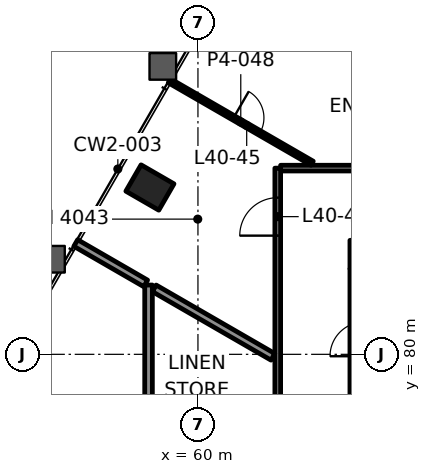
"""IFC4 building model, lengths in metres.
Left out: names, types, materials, properties, quantities, classifications, styles, units other than length and angle.
Written with IfcOpenShell. Run it as: python <this file> out.ifc"""

import sys

from ifc_helpers import new_model, si_unit, direction, frame, frame_2d, origin, origin_2d, place, context, subcontext, project, spatial, rectangle, hollow_rectangle, extrude, element, fill, save


model = new_model("IFC4")
c1 = context("Model", 3, precision=1e-05, world=origin(), true_north=direction((0.0, 1.0)))
c2 = subcontext(c1, "Body", "Model", "MODEL_VIEW")
j1 = project(units=[si_unit("LENGTHUNIT", "METRE"), si_unit("PLANEANGLEUNIT", "RADIAN")], contexts=[c1])
p1 = place(None, origin())
s1 = spatial("IfcSite", under=j1, at=p1, CompositionType="ELEMENT")
p2 = place(p1, origin())
s2 = spatial("IfcBuilding", under=s1, at=p2, CompositionType="ELEMENT")
p3 = place(p2, frame((0.0, 0.0, 175.3)))
s3 = spatial("IfcBuildingStorey", under=s2, at=p3, CompositionType="ELEMENT", Elevation=175.3)
p4 = place(p3, frame((58.737, 84.39, -0.0), z_axis=(0.0, 0.0, 1.0), x_axis=(-0.5, -0.866025403784, 0.0)))
e1 = element("IfcColumn", 1, at=p4, inside=s3, PredefinedType="COLUMN", context=c2, shape_type="SweptSolid", body=[
    extrude(hollow_rectangle(XDim=0.8, YDim=1.0, WallThickness=0.05, at=origin_2d()), origin(), (0.0, 0.0, 1.0), 3.9),
])
p5 = place(p3, frame((64.0, 82.625, 0.0), z_axis=(0.0, 0.0, 1.0), x_axis=(1.0, 0.0, 0.0)))
e2 = element("IfcWall", 2, at=p5, inside=s3, PredefinedType="SHEAR", context=c2, shape_type="SweptSolid", body=[
    extrude(rectangle(XDim=22.0, YDim=0.75, at=frame_2d((11.0, 0.0))), origin(), (0.0, 0.0, 1.0), 3.7),
])
p6 = place(p5, frame((3.695, 0.0, 0.0)))
e3 = element("IfcOpeningElement", 3, at=p6, cuts=e2, PredefinedType="OPENING", context=c2, shape_type="SweptSolid", body=[
    extrude(rectangle(XDim=1.0, YDim=2.1, at=frame_2d((0.5, 1.05))), frame((0.0, 0.385, 0.0), z_axis=(0.0, -1.0, 0.0), x_axis=(1.0, 0.0, 0.0)), (0.0, 0.0, 1.0), 0.77),
])
p7 = place(p5, frame((17.505, 0.0, 0.0)))
e4 = element("IfcOpeningElement", 4, at=p7, cuts=e2, PredefinedType="OPENING", context=c2, shape_type="SweptSolid", body=[
    extrude(rectangle(XDim=1.0, YDim=2.1, at=frame_2d((0.5, 1.05))), frame((0.0, 0.385, 0.0), z_axis=(0.0, -1.0, 0.0), x_axis=(1.0, 0.0, 0.0)), (0.0, 0.0, 1.0), 0.77),
])
p8 = place(p5, frame((10.65, 0.0, 0.0)))
e5 = element("IfcOpeningElement", 5, at=p8, cuts=e2, PredefinedType="OPENING", context=c2, shape_type="SweptSolid", body=[
    extrude(rectangle(XDim=0.9, YDim=2.1, at=frame_2d((0.45, 1.05))), frame((0.0, 0.385, 0.0), z_axis=(0.0, -1.0, 0.0), x_axis=(1.0, 0.0, 0.0)), (0.0, 0.0, 1.0), 0.77),
])
p9 = place(p3, frame((64.375, 67.75, 0.0), z_axis=(0.0, 0.0, 1.0), x_axis=(0.0, 1.0, 0.0)))
e6 = element("IfcWall", 6, at=p9, inside=s3, PredefinedType="SHEAR", context=c2, shape_type="SweptSolid", body=[
    extrude(rectangle(XDim=14.5, YDim=0.75, at=frame_2d((7.25, 0.0))), origin(), (0.0, 0.0, 1.0), 3.7),
])
p10 = place(p9, frame((4.65, 0.0, 0.0)))
e7 = element("IfcOpeningElement", 7, at=p10, cuts=e6, PredefinedType="OPENING", context=c2, shape_type="SweptSolid", body=[
    extrude(rectangle(XDim=1.8, YDim=2.1, at=frame_2d((0.9, 1.05))), frame((0.0, 0.385, 0.0), z_axis=(0.0, -1.0, 0.0), x_axis=(1.0, 0.0, 0.0)), (0.0, 0.0, 1.0), 0.77),
])
p11 = place(p9, frame((8.5, 0.0, 0.0)))
e8 = element("IfcOpeningElement", 8, at=p11, cuts=e6, PredefinedType="OPENING", context=c2, shape_type="SweptSolid", body=[
    extrude(rectangle(XDim=0.9, YDim=2.1, at=frame_2d((0.45, 1.05))), frame((0.0, 0.385, 0.0), z_axis=(0.0, -1.0, 0.0), x_axis=(1.0, 0.0, 0.0)), (0.0, 0.0, 1.0), 0.77),
])
p12 = place(p9, frame((12.2, 0.0, 0.0)))
e9 = element("IfcOpeningElement", 9, at=p12, cuts=e6, PredefinedType="OPENING", context=c2, shape_type="SweptSolid", body=[
    extrude(rectangle(XDim=0.9, YDim=2.1, at=frame_2d((0.45, 1.05))), frame((0.0, 0.385, 0.0), z_axis=(0.0, -1.0, 0.0), x_axis=(1.0, 0.0, 0.0)), (0.0, 0.0, 1.0), 0.77),
])
p13 = place(p3, frame((62.176, 84.9, 0.0), z_axis=(0.0, 0.0, 1.0), x_axis=(1.0, 0.0, 0.0)))
e10 = element("IfcWall", 10, at=p13, inside=s3, PredefinedType="PARTITIONING", context=c2, shape_type="SweptSolid", body=[
    extrude(rectangle(XDim=9.55, YDim=0.15, at=frame_2d((4.775, 0.0))), origin(), (0.0, 0.0, 1.0), 3.1),
])
p14 = place(p3, frame((62.1, 68.591, 0.0), z_axis=(0.0, 0.0, 1.0), x_axis=(0.0, 1.0, 0.0)))
e11 = element("IfcWall", 11, at=p14, inside=s3, PredefinedType="PARTITIONING", context=c2, shape_type="SweptSolid", body=[
    extrude(rectangle(XDim=16.308, YDim=0.15, at=frame_2d((8.154, 0.0))), origin(), (0.0, 0.0, 1.0), 3.1),
])
p15 = place(p14, frame((4.999, 0.0, 0.0)))
e12 = element("IfcOpeningElement", 12, at=p15, cuts=e11, PredefinedType="OPENING", context=c2, shape_type="SweptSolid", body=[
    extrude(rectangle(XDim=0.9, YDim=2.1, at=frame_2d((0.45, 1.05))), frame((0.0, 0.085, 0.0), z_axis=(0.0, -1.0, 0.0), x_axis=(1.0, 0.0, 0.0)), (0.0, 0.0, 1.0), 0.17),
])
p16 = place(p14, frame((8.879, 0.0, 0.0)))
e13 = element("IfcOpeningElement", 13, at=p16, cuts=e11, PredefinedType="OPENING", context=c2, shape_type="SweptSolid", body=[
    extrude(rectangle(XDim=0.9, YDim=2.1, at=frame_2d((0.45, 1.05))), frame((0.0, 0.085, 0.0), z_axis=(0.0, -1.0, 0.0), x_axis=(1.0, 0.0, 0.0)), (0.0, 0.0, 1.0), 0.17),
])
p17 = place(p14, frame((14.532, 0.0, 0.0)))
e14 = element("IfcOpeningElement", 14, at=p17, cuts=e11, PredefinedType="OPENING", context=c2, shape_type="SweptSolid", body=[
    extrude(rectangle(XDim=1.0, YDim=2.1, at=frame_2d((0.5, 1.05))), frame((0.0, 0.085, 0.0), z_axis=(0.0, -1.0, 0.0), x_axis=(1.0, 0.0, 0.0)), (0.0, 0.0, 1.0), 0.17),
])
p18 = place(p3, frame((58.7, 74.063, 0.0), z_axis=(0.0, 0.0, 1.0), x_axis=(0.0, 1.0, 0.0)))
e15 = element("IfcWall", 15, at=p18, inside=s3, PredefinedType="PARTITIONING", context=c2, shape_type="SweptSolid", body=[
    extrude(rectangle(XDim=7.76, YDim=0.2, at=frame_2d((3.88, 0.0))), origin(), (0.0, 0.0, 1.0), 3.1),
])
p19 = place(p3, frame((59.249, 87.198, 0.0), z_axis=(0.0, 0.0, 1.0), x_axis=(0.866006496088, -0.50003274766, 0.0)))
e16 = element("IfcWall", 16, at=p19, inside=s3, PredefinedType="PARTITIONING", context=c2, shape_type="SweptSolid", body=[
    extrude(rectangle(XDim=4.336, YDim=0.12, at=frame_2d((2.168, 0.0))), origin(), (0.0, 0.0, 1.0), 3.022),
])
p20 = place(p19, frame((1.948, 0.0, 0.0)))
e17 = element("IfcOpeningElement", 17, at=p20, cuts=e16, PredefinedType="OPENING", context=c2, shape_type="SweptSolid", body=[
    extrude(rectangle(XDim=0.8, YDim=2.1, at=frame_2d((0.4, 1.05))), frame((0.0, 0.07, 0.0), z_axis=(0.0, -1.0, 0.0), x_axis=(1.0, 0.0, 0.0)), (0.0, 0.0, 1.0), 0.14),
])
p21 = place(p3, frame((61.973, 79.934, 0.0), z_axis=(0.0, 0.0, 1.0), x_axis=(-0.866022099498, 0.500005723148, 0.0)))
e18 = element("IfcWall", 18, at=p21, inside=s3, PredefinedType="PARTITIONING", context=c2, shape_type="SweptSolid", body=[
    extrude(rectangle(XDim=3.606, YDim=0.2, at=frame_2d((1.803, 0.0))), origin(), (0.0, 0.0, 1.0), 3.1),
])
p22 = place(p3, frame((58.625, 81.867, 0.0), z_axis=(0.0, 0.0, 1.0), x_axis=(-0.866078449842, 0.499908110276, 0.0)))
e19 = element("IfcWall", 19, at=p22, inside=s3, PredefinedType="PARTITIONING", context=c2, shape_type="SweptSolid", body=[
    extrude(rectangle(XDim=2.125, YDim=0.2, at=frame_2d((1.062, 0.0))), origin(), (0.0, 0.0, 1.0), 3.022),
])
p23 = place(p17, origin())
e20 = element("IfcDoor", 20, at=p23, inside=s3, OperationType="SINGLE_SWING_RIGHT", PredefinedType="DOOR", context=c2, shape_type="SweptSolid", body=[
    extrude(rectangle(XDim=1.0, YDim=2.1, at=frame_2d((0.5, 1.05))), frame((0.0, 0.025, 0.0), z_axis=(0.0, -1.0, 0.0), x_axis=(1.0, 0.0, 0.0)), (0.0, 0.0, 1.0), 0.05),
])
fill(e14, e20)
p24 = place(p20, origin())
e21 = element("IfcDoor", 21, at=p24, inside=s3, OperationType="SINGLE_SWING_RIGHT", PredefinedType="DOOR", context=c2, shape_type="SweptSolid", body=[
    extrude(rectangle(XDim=0.8, YDim=2.1, at=frame_2d((0.4, 1.05))), frame((0.0, 0.025, 0.0), z_axis=(0.0, -1.0, 0.0), x_axis=(1.0, 0.0, 0.0)), (0.0, 0.0, 1.0), 0.05),
])
fill(e17, e21)
save(model, sys.argv[1])
